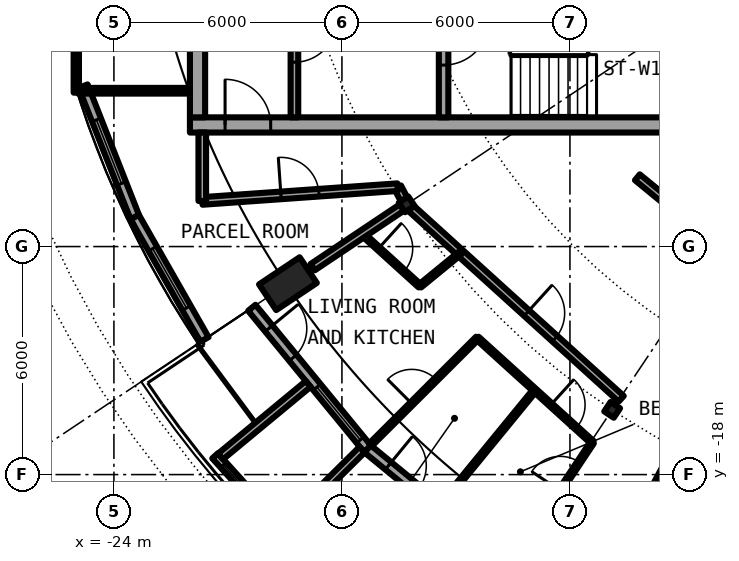
"""IFC4 building model, lengths in metres.
Left out: names, types, materials, properties, quantities, classifications, styles, units other than length and angle.
Written with IfcOpenShell. Run it as: python <this file> out.ifc"""

import sys

from ifc_helpers import new_model, si_unit, direction, frame, frame_2d, origin, origin_2d, place, context, subcontext, project, spatial, rectangle, circle, hollow_circle, i_section, extrude, element, fill, save


model = new_model("IFC4")
c1 = context("Model", 3, precision=1e-05, world=origin(), true_north=direction((0.0, 1.0)))
c2 = subcontext(c1, "Body", "Model", "MODEL_VIEW")
j1 = project(units=[si_unit("LENGTHUNIT", "METRE"), si_unit("PLANEANGLEUNIT", "RADIAN")], contexts=[c1])
p1 = place(None, origin())
s1 = spatial("IfcSite", under=j1, at=p1, CompositionType="ELEMENT")
p2 = place(p1, origin())
s2 = spatial("IfcBuilding", under=s1, at=p2, CompositionType="ELEMENT")
p3 = place(p2, frame((0.0, 0.0, 246.25)))
s3 = spatial("IfcBuildingStorey", under=s2, at=p3, CompositionType="ELEMENT", Elevation=246.25)
p4 = place(p3, frame((-19.955, -13.334, 0.0), z_axis=(0.346819263352, 0.231767499499, 0.908845545043), x_axis=(-0.555620411262, 0.831436082083, 0.0)))
e1 = element("IfcColumn", 1, at=p4, inside=s3, PredefinedType="COLUMN", context=c2, shape_type="SweptSolid", body=[
    extrude(hollow_circle(Radius=0.406, WallThickness=0.03, at=origin_2d()), origin(), (0.0, 0.0, 1.0), 3.081),
])
for number, where, z_axis, x_axis in (
    (2, (-16.297, -10.889, 0.0), (0.0, 0.0, 1.0), (-0.831, -0.556, 0.0)),
    (3, (-10.889, -16.297, 0.0), (0.0, 0.0, 1.0), (-0.556, -0.831, 0.0)),
):
    element("IfcColumn", number, at=place(p3, frame(where, z_axis=z_axis, x_axis=x_axis)), inside=s3, PredefinedType="COLUMN", context=c2, shape_type="SweptSolid", body=[
        extrude(i_section(OverallWidth=0.3, OverallDepth=0.3, WebThickness=0.011, FlangeThickness=0.019, FilletRadius=0.027, at=origin_2d()), origin(), (0.0, 0.0, 1.0), 3.05),
    ])
p5 = place(p3, frame((-20.371, -13.611, 0.0), z_axis=(0.0, 0.0, 1.0), x_axis=(0.634396836208, -0.773007538262, 0.0)))
e4 = element("IfcWall", 4, at=p5, inside=s3, PredefinedType="SOLIDWALL", context=c2, shape_type="SweptSolid", body=[
    extrude(rectangle(XDim=4.803, YDim=0.25, at=frame_2d((2.402, 0.0))), origin(), (0.0, 0.0, 1.0), 2.7),
])
p6 = place(p5, frame((0.704, 0.0, 0.0)))
e5 = element("IfcOpeningElement", 5, at=p6, cuts=e4, PredefinedType="OPENING", context=c2, shape_type="SweptSolid", body=[
    extrude(rectangle(XDim=1.0, YDim=2.2, at=frame_2d((0.5, 1.1))), frame((0.0, 0.135, 0.0), z_axis=(0.0, -1.0, 0.0), x_axis=(1.0, 0.0, 0.0)), (0.0, 0.0, 1.0), 0.27),
])
p7 = place(p5, frame((2.699, 0.0, 0.3)))
e6 = element("IfcOpeningElement", 6, at=p7, cuts=e4, PredefinedType="OPENING", context=c2, shape_type="SweptSolid", body=[
    extrude(rectangle(XDim=1.8, YDim=2.1, at=frame_2d((0.9, 1.05))), frame((0.0, 0.135, 0.0), z_axis=(0.0, -1.0, 0.0), x_axis=(1.0, 0.0, 0.0)), (0.0, 0.0, 1.0), 0.27),
])
p8 = place(p3, frame((-21.338, -17.506, -0.03), z_axis=(0.0, 0.0, 1.0), x_axis=(0.671487056022, -0.741016284298, 0.0)))
e7 = element("IfcWall", 7, at=p8, inside=s3, PredefinedType="SOLIDWALL", context=c2, shape_type="SweptSolid", body=[
    extrude(rectangle(XDim=2.718, YDim=0.2, at=frame_2d((1.359, 0.0))), origin(), (0.0, 0.0, 1.0), 2.73),
])
p9 = place(p8, frame((0.319, 0.0, 0.33)))
e8 = element("IfcOpeningElement", 8, at=p9, cuts=e7, PredefinedType="OPENING", context=c2, shape_type="SweptSolid", body=[
    extrude(circle(Radius=1.04, at=frame_2d((1.04, 1.04))), frame((0.0, 0.11, 0.0), z_axis=(0.0, -1.0, 0.0), x_axis=(1.0, 0.0, 0.0)), (0.0, 0.0, 1.0), 0.22),
])
p10 = place(p3, frame((-18.888, -15.615, -0.03), z_axis=(0.0, 0.0, 1.0), x_axis=(-0.770489638069, -0.637452521862, 0.0)))
e9 = element("IfcWall", 9, at=p10, inside=s3, PredefinedType="SOLIDWALL", context=c2, shape_type="SweptSolid", body=[
    extrude(rectangle(XDim=2.993, YDim=0.2, at=frame_2d((1.497, 0.0))), origin(), (0.0, 0.0, 1.0), 2.73),
])
p11 = place(p3, frame((-17.47, -17.344, -0.03), z_axis=(0.0, 0.0, 1.0), x_axis=(-0.709896457854, -0.704306055012, 0.0)))
e10 = element("IfcWall", 10, at=p11, inside=s3, PredefinedType="SOLIDWALL", context=c2, shape_type="SweptSolid", body=[
    extrude(rectangle(XDim=2.882, YDim=0.2, at=frame_2d((1.441, 0.0))), origin(), (0.0, 0.0, 1.0), 2.73),
])
p12 = place(p3, frame((-17.324, -17.324, 0.0), z_axis=(0.0, 0.0, 1.0), x_axis=(0.773007538262, -0.634396836208, 0.0)))
e11 = element("IfcWall", 11, at=p12, inside=s3, PredefinedType="SOLIDWALL", context=c2, shape_type="SweptSolid", body=[
    extrude(rectangle(XDim=4.803, YDim=0.25, at=frame_2d((2.402, 0.0))), origin(), (0.0, 0.0, 1.0), 2.7),
])
p13 = place(p12, frame((0.704, 0.0, 0.0)))
e12 = element("IfcOpeningElement", 12, at=p13, cuts=e11, PredefinedType="OPENING", context=c2, shape_type="SweptSolid", body=[
    extrude(rectangle(XDim=1.0, YDim=2.2, at=frame_2d((0.5, 1.1))), frame((0.0, 0.135, 0.0), z_axis=(0.0, -1.0, 0.0), x_axis=(1.0, 0.0, 0.0)), (0.0, 0.0, 1.0), 0.27),
])
p14 = place(p12, frame((2.542, 0.0, 0.3)))
e13 = element("IfcOpeningElement", 13, at=p14, cuts=e11, PredefinedType="OPENING", context=c2, shape_type="SweptSolid", body=[
    extrude(rectangle(XDim=1.8, YDim=2.1, at=frame_2d((0.9, 1.05))), frame((0.0, 0.135, 0.0), z_axis=(0.0, -1.0, 0.0), x_axis=(1.0, 0.0, 0.0)), (0.0, 0.0, 1.0), 0.27),
])
p15 = place(p3, frame((-24.809, -7.779, 0.0), z_axis=(0.0, 0.0, 1.0), x_axis=(0.366351636034, -0.930476479432, 0.0)))
e14 = element("IfcWall", 14, at=p15, inside=s3, PredefinedType="SOLIDWALL", context=c2, shape_type="SweptSolid", body=[
    extrude(rectangle(XDim=3.705, YDim=0.25, at=frame_2d((1.852, 0.0))), origin(), (0.0, 0.0, 1.0), 2.7),
])
p16 = place(p15, frame((0.952, 0.0, 0.3)))
e15 = element("IfcOpeningElement", 15, at=p16, cuts=e14, PredefinedType="OPENING", context=c2, shape_type="SweptSolid", body=[
    extrude(rectangle(XDim=1.8, YDim=2.1, at=frame_2d((0.9, 1.05))), frame((0.0, 0.135, 0.0), z_axis=(0.0, -1.0, 0.0), x_axis=(1.0, 0.0, 0.0)), (0.0, 0.0, 1.0), 0.27),
])
p17 = place(p3, frame((-23.452, -11.226, 0.0), z_axis=(0.0, 0.0, 1.0), x_axis=(0.495031435966, -0.868875064325, 0.0)))
e16 = element("IfcWall", 16, at=p17, inside=s3, PredefinedType="SOLIDWALL", context=c2, shape_type="SweptSolid", body=[
    extrude(rectangle(XDim=3.705, YDim=0.25, at=frame_2d((1.853, 0.0))), origin(), (0.0, 0.0, 1.0), 2.7),
])
p18 = place(p17, frame((0.952, 0.0, 0.3)))
e17 = element("IfcOpeningElement", 17, at=p18, cuts=e16, PredefinedType="OPENING", context=c2, shape_type="SweptSolid", body=[
    extrude(rectangle(XDim=1.8, YDim=2.1, at=frame_2d((0.9, 1.05))), frame((0.0, 0.135, 0.0), z_axis=(0.0, -1.0, 0.0), x_axis=(1.0, 0.0, 0.0)), (0.0, 0.0, 1.0), 0.27),
])
p19 = place(p3, frame((-22.0, -8.8, 0.0), z_axis=(0.0, 0.0, 1.0), x_axis=(1.0, 0.0, 0.0)))
e18 = element("IfcWall", 18, at=p19, inside=s3, PredefinedType="SHEAR", context=c2, shape_type="SweptSolid", body=[
    extrude(rectangle(XDim=13.4, YDim=0.4, at=frame_2d((6.7, 0.0))), origin(), (0.0, 0.0, 1.0), 3.05),
])
p20 = place(p19, frame((0.925, 0.0, 0.0)))
e19 = element("IfcOpeningElement", 19, at=p20, cuts=e18, PredefinedType="OPENING", context=c2, shape_type="SweptSolid", body=[
    extrude(rectangle(XDim=1.2, YDim=2.3, at=frame_2d((0.6, 1.15))), frame((0.0, 0.21, 0.0), z_axis=(0.0, -1.0, 0.0), x_axis=(1.0, 0.0, 0.0)), (0.0, 0.0, 1.0), 0.42),
])
p21 = place(p3, frame((-21.8, -8.6, 0.0), z_axis=(0.0, 0.0, 1.0), x_axis=(0.0, 1.0, 0.0)))
e20 = element("IfcWall", 20, at=p21, inside=s3, PredefinedType="SHEAR", context=c2, shape_type="SweptSolid", body=[
    extrude(rectangle(XDim=17.2, YDim=0.4, at=frame_2d((8.6, 0.0))), origin(), (0.0, 0.0, 1.0), 3.05),
])
p22 = place(p21, frame((7.7, 0.0, 0.0)))
e21 = element("IfcOpeningElement", 21, at=p22, cuts=e20, PredefinedType="OPENING", context=c2, shape_type="SweptSolid", body=[
    extrude(rectangle(XDim=1.8, YDim=2.3, at=frame_2d((0.9, 1.15))), frame((0.0, 0.21, 0.0), z_axis=(0.0, -1.0, 0.0), x_axis=(1.0, 0.0, 0.0)), (0.0, 0.0, 1.0), 0.42),
])
p23 = place(p3, frame((-15.325, -4.65, 0.0), z_axis=(0.0, 0.0, 1.0), x_axis=(0.0, -1.0, 0.0)))
e22 = element("IfcWall", 22, at=p23, inside=s3, PredefinedType="SHEAR", context=c2, shape_type="SweptSolid", body=[
    extrude(rectangle(XDim=3.95, YDim=0.25, at=frame_2d((1.975, 0.0))), origin(), (0.0, 0.0, 1.0), 3.05),
])
p24 = place(p23, frame((1.375, 0.0, 0.0)))
e23 = element("IfcOpeningElement", 23, at=p24, cuts=e22, PredefinedType="OPENING", context=c2, shape_type="SweptSolid", body=[
    extrude(rectangle(XDim=1.2, YDim=2.3, at=frame_2d((0.6, 1.15))), frame((0.0, 0.135, 0.0), z_axis=(0.0, -1.0, 0.0), x_axis=(1.0, 0.0, 0.0)), (0.0, 0.0, 1.0), 0.27),
])
p25 = place(p3, frame((-19.25, -1.575, 0.0), z_axis=(0.0, 0.0, 1.0), x_axis=(0.0, -1.0, 0.0)))
e24 = element("IfcWall", 24, at=p25, inside=s3, PredefinedType="SOLIDWALL", context=c2, shape_type="SweptSolid", body=[
    extrude(rectangle(XDim=7.025, YDim=0.2, at=frame_2d((3.513, 0.0))), origin(), (0.0, 0.0, 1.0), 2.7),
])
p26 = place(p25, frame((4.475, 0.0, 0.0)))
e25 = element("IfcOpeningElement", 25, at=p26, cuts=e24, PredefinedType="OPENING", context=c2, shape_type="SweptSolid", body=[
    extrude(rectangle(XDim=1.1, YDim=2.3, at=frame_2d((0.55, 1.15))), frame((0.0, 0.11, 0.0), z_axis=(0.0, -1.0, 0.0), x_axis=(1.0, 0.0, 0.0)), (0.0, 0.0, 1.0), 0.22),
])
p27 = place(p3, frame((-22.0, -7.9, 0.0), z_axis=(0.0, 0.0, 1.0), x_axis=(-1.0, 0.0, 0.0)))
e26 = element("IfcWall", 26, at=p27, inside=s3, PredefinedType="PARTITIONING", context=c2, shape_type="SweptSolid", body=[
    extrude(rectangle(XDim=2.94, YDim=0.15, at=frame_2d((1.47, 0.0))), origin(), (0.0, 0.0, 1.0), 2.7),
])
p28 = place(p3, frame((-25.0, 7.95, 0.0), z_axis=(0.0, 0.0, 1.0), x_axis=(0.0, -1.0, 0.0)))
e27 = element("IfcWall", 27, at=p28, inside=s3, PredefinedType="PARTITIONING", context=c2, shape_type="SweptSolid", body=[
    extrude(rectangle(XDim=15.9, YDim=0.12, at=frame_2d((7.95, 0.0))), origin(), (0.0, 0.0, 1.0), 2.7),
])
p29 = place(p28, frame((0.95, 0.0, 0.1)))
e28 = element("IfcOpeningElement", 28, at=p29, cuts=e27, PredefinedType="OPENING", context=c2, shape_type="SweptSolid", body=[
    extrude(rectangle(XDim=14.0, YDim=2.35, at=frame_2d((7.0, 1.175))), frame((0.0, 0.07, 0.0), z_axis=(0.0, -1.0, 0.0), x_axis=(1.0, 0.0, 0.0)), (0.0, 0.0, 1.0), 0.14),
])
p30 = place(p3, frame((-17.461, -11.667, 0.0), z_axis=(0.0, 0.0, 1.0), x_axis=(0.740773018627, -0.671755412984, 0.0)))
e29 = element("IfcWall", 29, at=p30, inside=s3, PredefinedType="PARTITIONING", context=c2, shape_type="SweptSolid", body=[
    extrude(rectangle(XDim=2.041, YDim=0.1, at=frame_2d((1.021, 0.0))), origin(), (0.0, 0.0, 1.0), 2.7),
])
p31 = place(p30, frame((0.571, 0.0, 0.0)))
e30 = element("IfcOpeningElement", 30, at=p31, cuts=e29, PredefinedType="OPENING", context=c2, shape_type="SweptSolid", body=[
    extrude(rectangle(XDim=0.9, YDim=2.3, at=frame_2d((0.45, 1.15))), frame((0.0, 0.06, 0.0), z_axis=(0.0, -1.0, 0.0), x_axis=(1.0, 0.0, 0.0)), (0.0, 0.0, 1.0), 0.12),
])
p32 = place(p3, frame((-14.437, -14.409, 0.0), z_axis=(0.0, 0.0, 1.0), x_axis=(0.740802780294, -0.671722592078, 0.0)))
e31 = element("IfcWall", 31, at=p32, inside=s3, PredefinedType="PARTITIONING", context=c2, shape_type="SweptSolid", body=[
    extrude(rectangle(XDim=4.082, YDim=0.1, at=frame_2d((2.041, 0.0))), origin(), (0.0, 0.0, 1.0), 2.7),
])
p33 = place(p32, frame((2.612, 0.0, 0.0)))
e32 = element("IfcOpeningElement", 32, at=p33, cuts=e31, PredefinedType="OPENING", context=c2, shape_type="SweptSolid", body=[
    extrude(rectangle(XDim=0.9, YDim=2.3, at=frame_2d((0.45, 1.15))), frame((0.0, 0.06, 0.0), z_axis=(0.0, -1.0, 0.0), x_axis=(1.0, 0.0, 0.0)), (0.0, 0.0, 1.0), 0.12),
])
p34 = place(p3, frame((-16.535, -10.437, 0.0), z_axis=(0.0, 0.0, 1.0), x_axis=(0.465802239822, -0.884888848035, 0.0)))
e33 = element("IfcWall", 33, at=p34, inside=s3, PredefinedType="PARTITIONING", context=c2, shape_type="SweptSolid", body=[
    extrude(rectangle(XDim=0.361, YDim=0.2, at=frame_2d((0.18, 0.0))), origin(), (0.0, 0.0, 1.0), 2.7),
])
p35 = place(p3, frame((-16.182, -10.993, 0.0), z_axis=(0.0, 0.0, 1.0), x_axis=(0.740939653983, -0.671571611339, 0.0)))
e34 = element("IfcWall", 34, at=p35, inside=s3, PredefinedType="PARTITIONING", context=c2, shape_type="SweptSolid", body=[
    extrude(rectangle(XDim=7.465, YDim=0.2, at=frame_2d((3.732, 0.0))), origin(), (0.0, 0.0, 1.0), 2.45),
])
p36 = place(p35, frame((4.107, 0.0, 0.0)))
e35 = element("IfcOpeningElement", 35, at=p36, cuts=e34, PredefinedType="OPENING", context=c2, shape_type="SweptSolid", body=[
    extrude(rectangle(XDim=1.0, YDim=2.3, at=frame_2d((0.5, 1.15))), frame((0.0, 0.11, 0.0), z_axis=(0.0, -1.0, 0.0), x_axis=(1.0, 0.0, 0.0)), (0.0, 0.0, 1.0), 0.22),
])
p37 = place(p3, frame((-10.226, -10.177, 0.0), z_axis=(0.0, 0.0, 1.0), x_axis=(0.773071783484, -0.634318545828, 0.0)))
e36 = element("IfcWall", 36, at=p37, inside=s3, PredefinedType="PARTITIONING", context=c2, shape_type="SweptSolid", body=[
    extrude(rectangle(XDim=5.803, YDim=0.2, at=frame_2d((2.901, 0.0))), origin(), (0.0, 0.0, 1.0), 2.7),
])
p38 = place(p37, frame((0.949, 0.0, 0.0)))
e37 = element("IfcOpeningElement", 37, at=p38, cuts=e36, PredefinedType="OPENING", context=c2, shape_type="SweptSolid", body=[
    extrude(rectangle(XDim=1.0, YDim=2.3, at=frame_2d((0.5, 1.15))), frame((0.0, 0.11, 0.0), z_axis=(0.0, -1.0, 0.0), x_axis=(1.0, 0.0, 0.0)), (0.0, 0.0, 1.0), 0.22),
])
p39 = place(p3, frame((-21.675, -10.8, 0.0), z_axis=(0.0, 0.0, 1.0), x_axis=(0.997515141784, 0.070452408845, 0.0)))
e38 = element("IfcWall", 38, at=p39, inside=s3, PredefinedType="PARTITIONING", context=c2, shape_type="SweptSolid", body=[
    extrude(rectangle(XDim=5.153, YDim=0.2, at=frame_2d((2.576, 0.0))), origin(), (0.0, 0.0, 1.0), 2.7),
])
p40 = place(p39, frame((2.076, 0.0, 0.0)))
e39 = element("IfcOpeningElement", 39, at=p40, cuts=e38, PredefinedType="OPENING", context=c2, shape_type="SweptSolid", body=[
    extrude(rectangle(XDim=1.0, YDim=2.3, at=frame_2d((0.5, 1.15))), frame((0.0, 0.11, 0.0), z_axis=(0.0, -1.0, 0.0), x_axis=(1.0, 0.0, 0.0)), (0.0, 0.0, 1.0), 0.22),
])
p41 = place(p3, frame((-18.769, -12.541, 0.0), z_axis=(0.0, 0.0, 1.0), x_axis=(0.83131782921, 0.555797325324, 0.0)))
e40 = element("IfcWall", 40, at=p41, inside=s3, PredefinedType="PARTITIONING", context=c2, shape_type="SweptSolid", body=[
    extrude(rectangle(XDim=2.823, YDim=0.2, at=frame_2d((1.412, 0.0))), origin(), (0.0, 0.0, 1.0), 2.7),
])
p42 = place(p3, frame((-17.252, -17.219, 0.0), z_axis=(0.0, 0.0, 1.0), x_axis=(0.707720109647, 0.706492920277, 0.0)))
e41 = element("IfcWall", 41, at=p42, inside=s3, PredefinedType="PARTITIONING", context=c2, shape_type="SweptSolid", body=[
    extrude(rectangle(XDim=3.979, YDim=0.1, at=frame_2d((1.989, 0.0))), origin(), (0.0, 0.0, 1.0), 2.7),
])
p43 = place(p42, frame((1.539, 0.0, 0.0)))
e42 = element("IfcOpeningElement", 42, at=p43, cuts=e41, PredefinedType="OPENING", context=c2, shape_type="SweptSolid", body=[
    extrude(rectangle(XDim=0.9, YDim=2.3, at=frame_2d((0.45, 1.15))), frame((0.0, 0.06, 0.0), z_axis=(0.0, -1.0, 0.0), x_axis=(1.0, 0.0, 0.0)), (0.0, 0.0, 1.0), 0.12),
])
p44 = place(p3, frame((-15.949, -13.038, 0.0), z_axis=(0.0, 0.0, 1.0), x_axis=(0.774099733189, 0.633063664315, 0.0)))
e43 = element("IfcWall", 43, at=p44, inside=s3, PredefinedType="PARTITIONING", context=c2, shape_type="SweptSolid", body=[
    extrude(rectangle(XDim=1.375, YDim=0.1, at=frame_2d((0.687, 0.0))), origin(), (0.0, 0.0, 1.0), 2.7),
])
p45 = place(p3, frame((-15.445, -18.857, 0.0), z_axis=(0.0, 0.0, 1.0), x_axis=(0.633648720881, 0.77362090104, 0.0)))
e44 = element("IfcWall", 44, at=p45, inside=s3, PredefinedType="PARTITIONING", context=c2, shape_type="SweptSolid", body=[
    extrude(rectangle(XDim=3.979, YDim=0.1, at=frame_2d((1.989, 0.0))), origin(), (0.0, 0.0, 1.0), 2.7),
])
p46 = place(p3, frame((-12.505, -18.793, 0.0), z_axis=(0.0, 0.0, 1.0), x_axis=(0.553786211634, 0.832658892827, 0.0)))
e45 = element("IfcWall", 45, at=p46, inside=s3, PredefinedType="PARTITIONING", context=c2, shape_type="SweptSolid", body=[
    extrude(rectangle(XDim=1.973, YDim=0.1, at=frame_2d((0.987, 0.0))), origin(), (0.0, 0.0, 1.0), 2.7),
])
p47 = place(p46, frame((0.448, 0.0, 0.0)))
e46 = element("IfcOpeningElement", 46, at=p47, cuts=e45, PredefinedType="OPENING", context=c2, shape_type="SweptSolid", body=[
    extrude(rectangle(XDim=0.9, YDim=2.3, at=frame_2d((0.45, 1.15))), frame((0.0, 0.06, 0.0), z_axis=(0.0, -1.0, 0.0), x_axis=(1.0, 0.0, 0.0)), (0.0, 0.0, 1.0), 0.12),
])
p48 = place(p3, frame((-21.675, -10.8, 0.0), z_axis=(0.0, 0.0, 1.0), x_axis=(0.0, 1.0, 0.0)))
e47 = element("IfcWall", 47, at=p48, inside=s3, PredefinedType="PARTITIONING", context=c2, shape_type="SweptSolid", body=[
    extrude(rectangle(XDim=1.8, YDim=0.2, at=frame_2d((0.9, 0.0))), origin(), (0.0, 0.0, 1.0), 2.7),
])
p49 = place(p3, frame((-9.889, -18.502, 0.0), z_axis=(0.0, 0.0, 1.0), x_axis=(0.471138605408, 0.882059189904, 0.0)))
e48 = element("IfcWall", 48, at=p49, inside=s3, PredefinedType="PARTITIONING", context=c2, shape_type="SweptSolid", body=[
    extrude(rectangle(XDim=1.358, YDim=0.1, at=frame_2d((0.679, 0.0))), origin(), (0.0, 0.0, 1.0), 2.7),
])
p50 = place(p6, origin())
e49 = element("IfcDoor", 49, at=p50, inside=s3, OperationType="SINGLE_SWING_LEFT", PredefinedType="DOOR", context=c2, shape_type="SweptSolid", body=[
    extrude(rectangle(XDim=1.0, YDim=2.2, at=frame_2d((0.5, 1.1))), frame((0.0, 0.025, 0.0), z_axis=(0.0, -1.0, 0.0), x_axis=(1.0, 0.0, 0.0)), (0.0, 0.0, 1.0), 0.05),
])
fill(e5, e49)
p51 = place(p7, origin())
e50 = element("IfcWindow", 50, at=p51, inside=s3, PartitioningType="SINGLE_PANEL", PredefinedType="WINDOW", context=c2, shape_type="SweptSolid", body=[
    extrude(rectangle(XDim=1.8, YDim=2.1, at=frame_2d((0.9, 1.05))), frame((0.0, 0.03, 0.0), z_axis=(0.0, -1.0, 0.0), x_axis=(1.0, 0.0, 0.0)), (0.0, 0.0, 1.0), 0.06),
])
fill(e6, e50)
p52 = place(p9, origin())
e51 = element("IfcWindow", 51, at=p52, inside=s3, PartitioningType="SINGLE_PANEL", PredefinedType="WINDOW", context=c2, shape_type="SweptSolid", body=[
    extrude(circle(Radius=1.04, at=frame_2d((1.04, 1.04))), frame((0.0, 0.03, 0.0), z_axis=(0.0, -1.0, 0.0), x_axis=(1.0, 0.0, 0.0)), (0.0, 0.0, 1.0), 0.06),
])
fill(e8, e51)
p53 = place(p13, origin())
e52 = element("IfcDoor", 52, at=p53, inside=s3, OperationType="SINGLE_SWING_LEFT", PredefinedType="DOOR", context=c2, shape_type="SweptSolid", body=[
    extrude(rectangle(XDim=1.0, YDim=2.2, at=frame_2d((0.5, 1.1))), frame((0.0, 0.025, 0.0), z_axis=(0.0, -1.0, 0.0), x_axis=(1.0, 0.0, 0.0)), (0.0, 0.0, 1.0), 0.05),
])
fill(e12, e52)
p54 = place(p16, origin())
e53 = element("IfcWindow", 53, at=p54, inside=s3, PartitioningType="SINGLE_PANEL", PredefinedType="WINDOW", context=c2, shape_type="SweptSolid", body=[
    extrude(rectangle(XDim=1.8, YDim=2.1, at=frame_2d((0.9, 1.05))), frame((0.0, 0.03, 0.0), z_axis=(0.0, -1.0, 0.0), x_axis=(1.0, 0.0, 0.0)), (0.0, 0.0, 1.0), 0.06),
])
fill(e15, e53)
p55 = place(p18, origin())
e54 = element("IfcWindow", 54, at=p55, inside=s3, PartitioningType="SINGLE_PANEL", PredefinedType="WINDOW", context=c2, shape_type="SweptSolid", body=[
    extrude(rectangle(XDim=1.8, YDim=2.1, at=frame_2d((0.9, 1.05))), frame((0.0, 0.03, 0.0), z_axis=(0.0, -1.0, 0.0), x_axis=(1.0, 0.0, 0.0)), (0.0, 0.0, 1.0), 0.06),
])
fill(e17, e54)
p56 = place(p24, origin())
e55 = element("IfcDoor", 55, at=p56, inside=s3, OperationType="SINGLE_SWING_LEFT", PredefinedType="DOOR", context=c2, shape_type="SweptSolid", body=[
    extrude(rectangle(XDim=1.2, YDim=2.3, at=frame_2d((0.6, 1.15))), frame((0.0, 0.025, 0.0), z_axis=(0.0, -1.0, 0.0), x_axis=(1.0, 0.0, 0.0)), (0.0, 0.0, 1.0), 0.05),
])
fill(e23, e55)
p57 = place(p26, origin())
e56 = element("IfcDoor", 56, at=p57, inside=s3, OperationType="SINGLE_SWING_LEFT", PredefinedType="DOOR", context=c2, shape_type="SweptSolid", body=[
    extrude(rectangle(XDim=1.1, YDim=2.3, at=frame_2d((0.55, 1.15))), frame((0.0, 0.025, 0.0), z_axis=(0.0, -1.0, 0.0), x_axis=(1.0, 0.0, 0.0)), (0.0, 0.0, 1.0), 0.05),
])
fill(e25, e56)
p58 = place(p20, origin())
e57 = element("IfcDoor", 57, at=p58, inside=s3, OperationType="SINGLE_SWING_RIGHT", PredefinedType="DOOR", context=c2, shape_type="SweptSolid", body=[
    extrude(rectangle(XDim=1.2, YDim=2.3, at=frame_2d((0.6, 1.15))), frame((0.0, 0.025, 0.0), z_axis=(0.0, -1.0, 0.0), x_axis=(1.0, 0.0, 0.0)), (0.0, 0.0, 1.0), 0.05),
])
fill(e19, e57)
p59 = place(p29, origin())
e58 = element("IfcWindow", 58, at=p59, inside=s3, PartitioningType="SINGLE_PANEL", PredefinedType="WINDOW", context=c2, shape_type="SweptSolid", body=[
    extrude(rectangle(XDim=14.0, YDim=2.35, at=frame_2d((7.0, 1.175))), frame((0.0, 0.03, 0.0), z_axis=(0.0, -1.0, 0.0), x_axis=(1.0, 0.0, 0.0)), (0.0, 0.0, 1.0), 0.06),
])
fill(e28, e58)
p60 = place(p36, origin())
e59 = element("IfcDoor", 59, at=p60, inside=s3, OperationType="SINGLE_SWING_RIGHT", PredefinedType="DOOR", context=c2, shape_type="SweptSolid", body=[
    extrude(rectangle(XDim=1.0, YDim=2.3, at=frame_2d((0.5, 1.15))), frame((0.0, 0.025, 0.0), z_axis=(0.0, -1.0, 0.0), x_axis=(1.0, 0.0, 0.0)), (0.0, 0.0, 1.0), 0.05),
])
fill(e35, e59)
p61 = place(p31, origin())
e60 = element("IfcDoor", 60, at=p61, inside=s3, OperationType="SINGLE_SWING_LEFT", PredefinedType="DOOR", context=c2, shape_type="SweptSolid", body=[
    extrude(rectangle(XDim=0.9, YDim=2.3, at=frame_2d((0.45, 1.15))), frame((0.0, 0.025, 0.0), z_axis=(0.0, -1.0, 0.0), x_axis=(1.0, 0.0, 0.0)), (0.0, 0.0, 1.0), 0.05),
])
fill(e30, e60)
p62 = place(p43, origin())
e61 = element("IfcDoor", 61, at=p62, inside=s3, OperationType="SINGLE_SWING_RIGHT", PredefinedType="DOOR", context=c2, shape_type="SweptSolid", body=[
    extrude(rectangle(XDim=0.9, YDim=2.3, at=frame_2d((0.45, 1.15))), frame((0.0, 0.025, 0.0), z_axis=(0.0, -1.0, 0.0), x_axis=(1.0, 0.0, 0.0)), (0.0, 0.0, 1.0), 0.05),
])
fill(e42, e61)
p63 = place(p33, origin())
e62 = element("IfcDoor", 62, at=p63, inside=s3, OperationType="SINGLE_SWING_RIGHT", PredefinedType="DOOR", context=c2, shape_type="SweptSolid", body=[
    extrude(rectangle(XDim=0.9, YDim=2.3, at=frame_2d((0.45, 1.15))), frame((0.0, 0.025, 0.0), z_axis=(0.0, -1.0, 0.0), x_axis=(1.0, 0.0, 0.0)), (0.0, 0.0, 1.0), 0.05),
])
fill(e32, e62)
p64 = place(p47, origin())
e63 = element("IfcDoor", 63, at=p64, inside=s3, OperationType="SINGLE_SWING_LEFT", PredefinedType="DOOR", context=c2, shape_type="SweptSolid", body=[
    extrude(rectangle(XDim=0.9, YDim=2.3, at=frame_2d((0.45, 1.15))), frame((0.0, 0.025, 0.0), z_axis=(0.0, -1.0, 0.0), x_axis=(1.0, 0.0, 0.0)), (0.0, 0.0, 1.0), 0.05),
])
fill(e46, e63)
p65 = place(p40, origin())
e64 = element("IfcDoor", 64, at=p65, inside=s3, OperationType="SINGLE_SWING_RIGHT", PredefinedType="DOOR", context=c2, shape_type="SweptSolid", body=[
    extrude(rectangle(XDim=1.0, YDim=2.3, at=frame_2d((0.5, 1.15))), frame((0.0, 0.025, 0.0), z_axis=(0.0, -1.0, 0.0), x_axis=(1.0, 0.0, 0.0)), (0.0, 0.0, 1.0), 0.05),
])
fill(e39, e64)
save(model, sys.argv[1])
